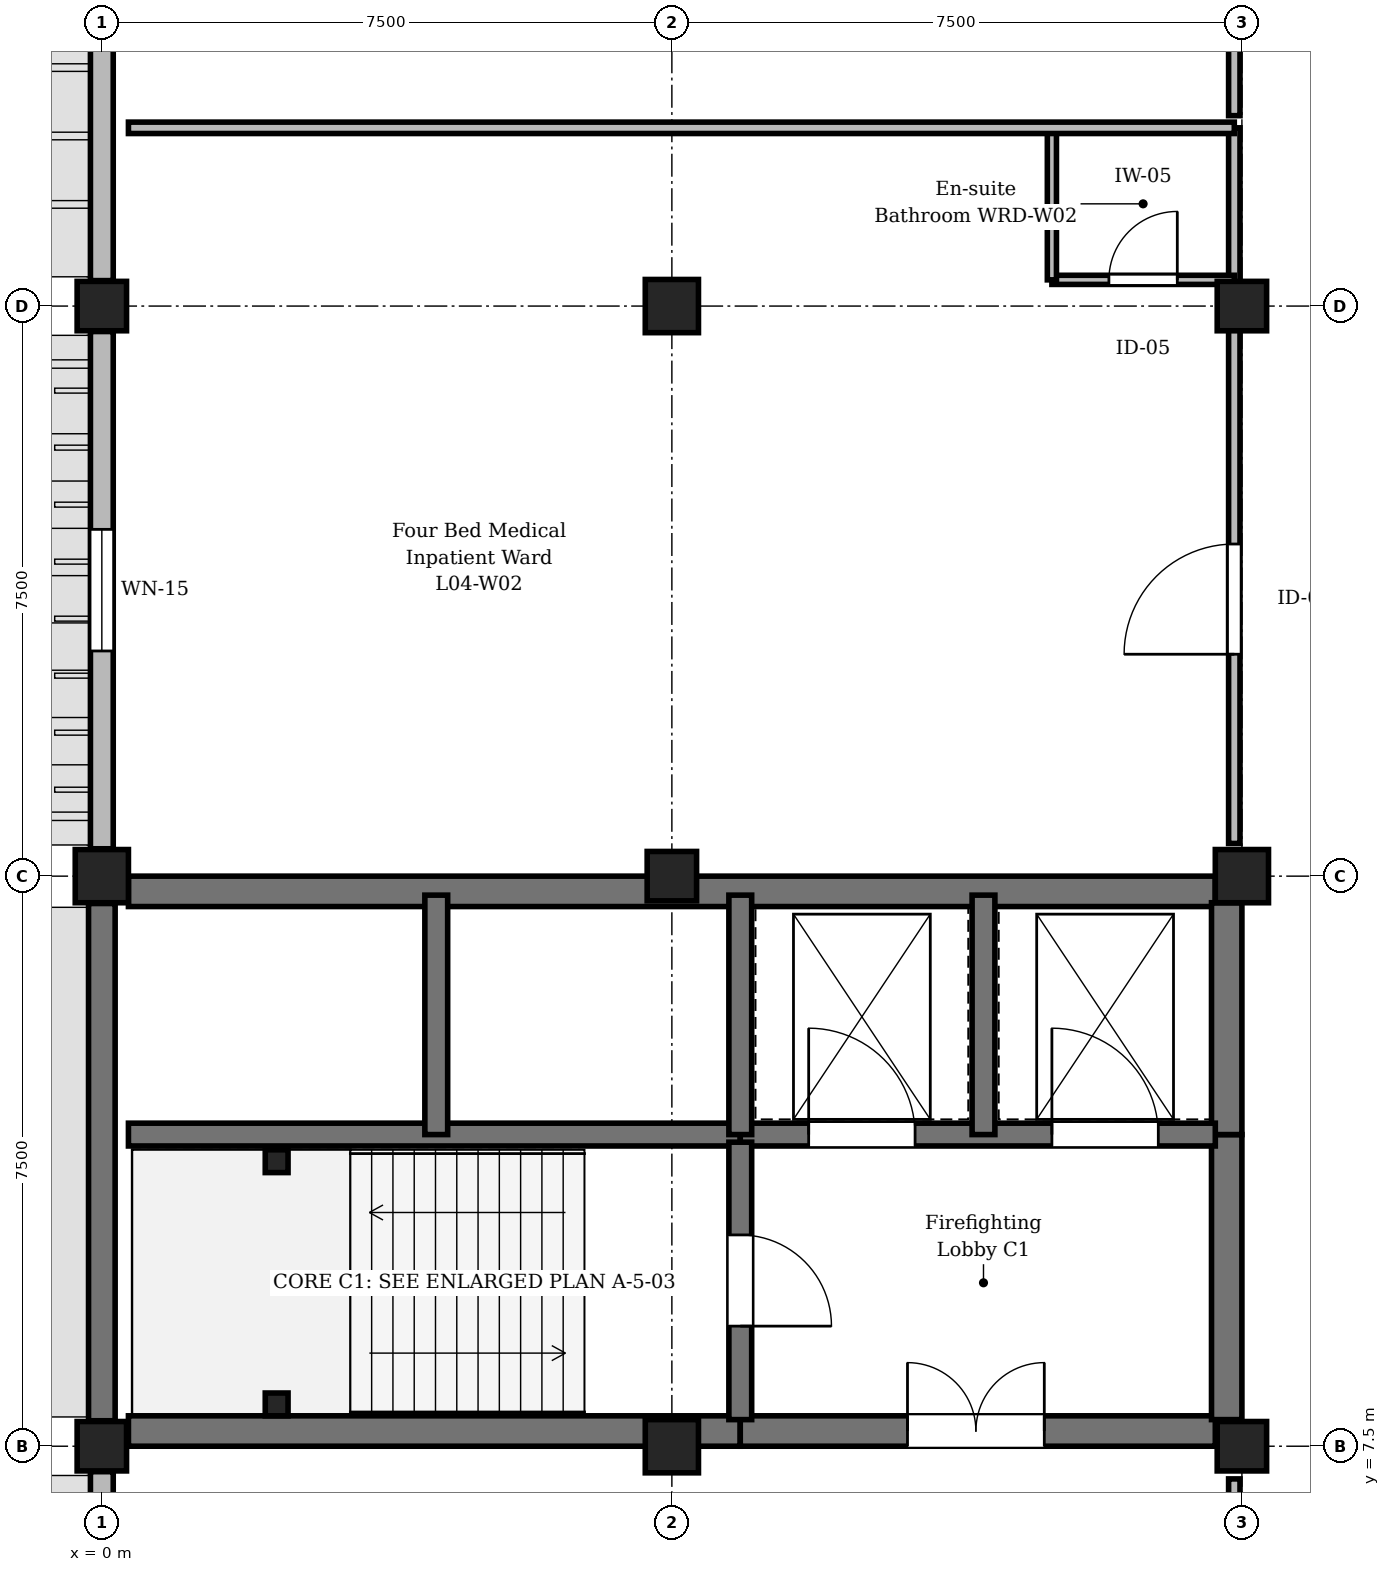
"""IFC4 building model, lengths in metres.
Left out: names, types, materials, properties, quantities, classifications, styles, units other than length and angle.
Written with IfcOpenShell. Run it as: python <this file> out.ifc"""

import sys

from ifc_helpers import new_model, si_unit, direction, frame, frame_2d, origin, origin_2d, place, context, subcontext, project, spatial, rectangle, i_section, extrude, element, fill, save


model = new_model("IFC4")
c1 = context("Model", 3, precision=1e-05, world=origin(), true_north=direction((0.0, 1.0)))
c2 = subcontext(c1, "Body", "Model", "MODEL_VIEW")
j1 = project(units=[si_unit("LENGTHUNIT", "METRE"), si_unit("PLANEANGLEUNIT", "RADIAN")], contexts=[c1])
p1 = place(None, origin())
s1 = spatial("IfcSite", under=j1, at=p1, CompositionType="ELEMENT")
p2 = place(p1, origin())
s2 = spatial("IfcBuilding", under=s1, at=p2, CompositionType="ELEMENT")
p3 = place(p2, frame((0.0, 0.0, 17.85)))
s3 = spatial("IfcBuildingStorey", under=s2, at=p3, CompositionType="ELEMENT", Elevation=17.85)
p4 = place(p3, frame((0.0, 7.5, 0.0), z_axis=(0.0, 0.0, 1.0), x_axis=(1.0, 0.0, 0.0)))
e1 = element("IfcColumn", 1, at=p4, inside=s3, PredefinedType="COLUMN", context=c2, shape_type="SweptSolid", body=[
    extrude(rectangle(XDim=0.65, YDim=0.65, at=origin_2d()), origin(), (0.0, 0.0, 1.0), 4.05),
])
p5 = place(p3, frame((0.0, 15.0, 0.0), z_axis=(0.0, 0.0, 1.0), x_axis=(1.0, 0.0, 0.0)))
e2 = element("IfcColumn", 2, at=p5, inside=s3, PredefinedType="COLUMN", context=c2, shape_type="SweptSolid", body=[
    extrude(rectangle(XDim=0.7, YDim=0.7, at=origin_2d()), origin(), (0.0, 0.0, 1.0), 4.05),
])
p6 = place(p3, frame((0.0, 22.5, 0.0), z_axis=(0.0, 0.0, 1.0), x_axis=(1.0, 0.0, 0.0)))
e3 = element("IfcColumn", 3, at=p6, inside=s3, PredefinedType="COLUMN", context=c2, shape_type="SweptSolid", body=[
    extrude(rectangle(XDim=0.65, YDim=0.65, at=origin_2d()), origin(), (0.0, 0.0, 1.0), 4.05),
])
p7 = place(p3, frame((7.5, 7.5, 0.0), z_axis=(0.0, 0.0, 1.0), x_axis=(1.0, 0.0, 0.0)))
e4 = element("IfcColumn", 4, at=p7, inside=s3, PredefinedType="COLUMN", context=c2, shape_type="SweptSolid", body=[
    extrude(rectangle(XDim=0.7, YDim=0.7, at=origin_2d()), origin(), (0.0, 0.0, 1.0), 4.05),
])
p8 = place(p3, frame((7.5, 15.0, 0.0), z_axis=(0.0, 0.0, 1.0), x_axis=(1.0, 0.0, 0.0)))
e5 = element("IfcColumn", 5, at=p8, inside=s3, PredefinedType="COLUMN", context=c2, shape_type="SweptSolid", body=[
    extrude(rectangle(XDim=0.65, YDim=0.65, at=origin_2d()), origin(), (0.0, 0.0, 1.0), 4.05),
])
p9 = place(p3, frame((7.5, 22.5, 0.0), z_axis=(0.0, 0.0, 1.0), x_axis=(1.0, 0.0, 0.0)))
e6 = element("IfcColumn", 6, at=p9, inside=s3, PredefinedType="COLUMN", context=c2, shape_type="SweptSolid", body=[
    extrude(rectangle(XDim=0.7, YDim=0.7, at=origin_2d()), origin(), (0.0, 0.0, 1.0), 4.05),
])
p10 = place(p3, frame((15.0, 7.5, 0.0), z_axis=(0.0, 0.0, 1.0), x_axis=(1.0, 0.0, 0.0)))
e7 = element("IfcColumn", 7, at=p10, inside=s3, PredefinedType="COLUMN", context=c2, shape_type="SweptSolid", body=[
    extrude(rectangle(XDim=0.65, YDim=0.65, at=origin_2d()), origin(), (0.0, 0.0, 1.0), 4.05),
])
p11 = place(p3, frame((15.0, 15.0, 0.0), z_axis=(0.0, 0.0, 1.0), x_axis=(1.0, 0.0, 0.0)))
e8 = element("IfcColumn", 8, at=p11, inside=s3, PredefinedType="COLUMN", context=c2, shape_type="SweptSolid", body=[
    extrude(rectangle(XDim=0.7, YDim=0.7, at=origin_2d()), origin(), (0.0, 0.0, 1.0), 4.05),
])
p12 = place(p3, frame((15.0, 22.5, 0.0), z_axis=(0.0, 0.0, 1.0), x_axis=(1.0, 0.0, 0.0)))
e9 = element("IfcColumn", 9, at=p12, inside=s3, PredefinedType="COLUMN", context=c2, shape_type="SweptSolid", body=[
    extrude(rectangle(XDim=0.65, YDim=0.65, at=origin_2d()), origin(), (0.0, 0.0, 1.0), 4.05),
])
for number, where, z_axis, x_axis in (
    (10, (2.3, 8.05, 0.0), (0.0, 0.0, 1.0), (1.0, 0.0, 0.0)),
    (11, (2.3, 11.25, 0.0), (0.0, 0.0, 1.0), (1.0, 0.0, 0.0)),
):
    element("IfcColumn", number, at=place(p3, frame(where, z_axis=z_axis, x_axis=x_axis)), inside=s3, PredefinedType="COLUMN", context=c2, shape_type="SweptSolid", body=[
        extrude(i_section(OverallWidth=0.3, OverallDepth=0.3, WebThickness=0.011, FlangeThickness=0.019, FilletRadius=0.027, at=origin_2d()), origin(), (0.0, 0.0, 1.0), 4.05),
    ])
p13 = place(p3, frame((0.0, 0.31, 0.0), z_axis=(0.0, 0.0, 1.0), x_axis=(0.0, 1.0, 0.0)))
e12 = element("IfcWall", 12, at=p13, inside=s3, PredefinedType="STANDARD", context=c2, shape_type="SweptSolid", body=[
    extrude(rectangle(XDim=6.855, YDim=0.3, at=frame_2d((3.427, 0.0))), origin(), (0.0, 0.0, 1.0), 3.17),
])
p14 = place(p13, frame((2.327, 0.0, 0.9)))
e13 = element("IfcOpeningElement", 13, at=p14, cuts=e12, PredefinedType="OPENING", context=c2, shape_type="SweptSolid", body=[
    extrude(rectangle(XDim=2.2, YDim=1.95, at=frame_2d((1.1, 0.975))), frame((0.0, 0.16, 0.0), z_axis=(0.0, -1.0, 0.0), x_axis=(1.0, 0.0, 0.0)), (0.0, 0.0, 1.0), 0.32),
])
p15 = place(p3, frame((0.0, 7.835, 0.0), z_axis=(0.0, 0.0, 1.0), x_axis=(0.0, 1.0, 0.0)))
e14 = element("IfcWall", 14, at=p15, inside=s3, PredefinedType="SHEAR", context=c2, shape_type="SweptSolid", body=[
    extrude(rectangle(XDim=6.805, YDim=0.35, at=frame_2d((3.402, 0.0))), origin(), (0.0, 0.0, 1.0), 3.77),
])
p16 = place(p3, frame((0.0, 15.36, 0.0), z_axis=(0.0, 0.0, 1.0), x_axis=(0.0, 1.0, 0.0)))
e15 = element("IfcWall", 15, at=p16, inside=s3, PredefinedType="STANDARD", context=c2, shape_type="SweptSolid", body=[
    extrude(rectangle(XDim=6.805, YDim=0.3, at=frame_2d((3.402, 0.0))), origin(), (0.0, 0.0, 1.0), 3.17),
])
p17 = place(p16, frame((2.603, 0.0, 0.9)))
e16 = element("IfcOpeningElement", 16, at=p17, cuts=e15, PredefinedType="OPENING", context=c2, shape_type="SweptSolid", body=[
    extrude(rectangle(XDim=1.6, YDim=1.8, at=frame_2d((0.8, 0.9))), frame((0.0, 0.16, 0.0), z_axis=(0.0, -1.0, 0.0), x_axis=(1.0, 0.0, 0.0)), (0.0, 0.0, 1.0), 0.32),
])
p18 = place(p3, frame((0.0, 22.835, 0.0), z_axis=(0.0, 0.0, 1.0), x_axis=(0.0, 1.0, 0.0)))
e17 = element("IfcWall", 17, at=p18, inside=s3, PredefinedType="STANDARD", context=c2, shape_type="SweptSolid", body=[
    extrude(rectangle(XDim=8.305, YDim=0.3, at=frame_2d((4.152, 0.0))), origin(), (0.0, 0.0, 1.0), 3.22),
])
p19 = place(p18, frame((3.252, 0.0, 0.9)))
e18 = element("IfcOpeningElement", 18, at=p19, cuts=e17, PredefinedType="OPENING", context=c2, shape_type="SweptSolid", body=[
    extrude(rectangle(XDim=1.8, YDim=1.8, at=frame_2d((0.9, 0.9))), frame((0.0, 0.16, 0.0), z_axis=(0.0, -1.0, 0.0), x_axis=(1.0, 0.0, 0.0)), (0.0, 0.0, 1.0), 0.32),
])
p20 = place(p3, frame((0.35, 7.7, 0.0), z_axis=(0.0, 0.0, 1.0), x_axis=(1.0, 0.0, 0.0)))
e19 = element("IfcWall", 19, at=p20, inside=s3, PredefinedType="SHEAR", context=c2, shape_type="SweptSolid", body=[
    extrude(rectangle(XDim=8.05, YDim=0.4, at=frame_2d((4.025, 0.0))), origin(), (0.0, 0.0, 1.0), 3.77),
])
p21 = place(p3, frame((8.4, 7.7, 0.0), z_axis=(0.0, 0.0, 1.0), x_axis=(1.0, 0.0, 0.0)))
e20 = element("IfcWall", 20, at=p21, inside=s3, PredefinedType="SHEAR", context=c2, shape_type="SweptSolid", body=[
    extrude(rectangle(XDim=6.25, YDim=0.4, at=frame_2d((3.125, 0.0))), origin(), (0.0, 0.0, 1.0), 3.77),
])
p22 = place(p21, frame((2.2, 0.0, 0.0)))
e21 = element("IfcOpeningElement", 21, at=p22, cuts=e20, PredefinedType="OPENING", context=c2, shape_type="SweptSolid", body=[
    extrude(rectangle(XDim=1.8, YDim=2.25, at=frame_2d((0.9, 1.125))), frame((0.0, 0.21, 0.0), z_axis=(0.0, -1.0, 0.0), x_axis=(1.0, 0.0, 0.0)), (0.0, 0.0, 1.0), 0.42),
])
p23 = place(p3, frame((0.35, 14.8, 0.0), z_axis=(0.0, 0.0, 1.0), x_axis=(1.0, 0.0, 0.0)))
e22 = element("IfcWall", 22, at=p23, inside=s3, PredefinedType="SHEAR", context=c2, shape_type="SweptSolid", body=[
    extrude(rectangle(XDim=14.3, YDim=0.4, at=frame_2d((7.15, 0.0))), origin(), (0.0, 0.0, 1.0), 3.77),
])
p24 = place(p3, frame((14.8, 7.85, 0.0), z_axis=(0.0, 0.0, 1.0), x_axis=(0.0, 1.0, 0.0)))
e23 = element("IfcWall", 23, at=p24, inside=s3, PredefinedType="SHEAR", context=c2, shape_type="SweptSolid", body=[
    extrude(rectangle(XDim=3.75, YDim=0.4, at=frame_2d((1.875, 0.0))), origin(), (0.0, 0.0, 1.0), 3.77),
])
p25 = place(p3, frame((14.8, 11.6, 0.0), z_axis=(0.0, 0.0, 1.0), x_axis=(0.0, 1.0, 0.0)))
e24 = element("IfcWall", 24, at=p25, inside=s3, PredefinedType="SHEAR", context=c2, shape_type="SweptSolid", body=[
    extrude(rectangle(XDim=3.05, YDim=0.4, at=frame_2d((1.525, 0.0))), origin(), (0.0, 0.0, 1.0), 3.77),
])
p26 = place(p3, frame((0.35, 11.6, 0.0), z_axis=(0.0, 0.0, 1.0), x_axis=(1.0, 0.0, 0.0)))
e25 = element("IfcWall", 25, at=p26, inside=s3, PredefinedType="SHEAR", context=c2, shape_type="SweptSolid", body=[
    extrude(rectangle(XDim=8.05, YDim=0.3, at=frame_2d((4.025, 0.0))), origin(), (0.0, 0.0, 1.0), 3.77),
])
p27 = place(p3, frame((8.4, 11.6, 0.0), z_axis=(0.0, 0.0, 1.0), x_axis=(1.0, 0.0, 0.0)))
e26 = element("IfcWall", 26, at=p27, inside=s3, PredefinedType="SHEAR", context=c2, shape_type="SweptSolid", body=[
    extrude(rectangle(XDim=6.25, YDim=0.3, at=frame_2d((3.125, 0.0))), origin(), (0.0, 0.0, 1.0), 3.77),
])
p28 = place(p27, frame((0.9, 0.0, 0.0)))
e27 = element("IfcOpeningElement", 27, at=p28, cuts=e26, PredefinedType="OPENING", context=c2, shape_type="SweptSolid", body=[
    extrude(rectangle(XDim=1.4, YDim=2.25, at=frame_2d((0.7, 1.125))), frame((0.0, 0.16, 0.0), z_axis=(0.0, -1.0, 0.0), x_axis=(1.0, 0.0, 0.0)), (0.0, 0.0, 1.0), 0.32),
])
p29 = place(p27, frame((4.1, 0.0, 0.0)))
e28 = element("IfcOpeningElement", 28, at=p29, cuts=e26, PredefinedType="OPENING", context=c2, shape_type="SweptSolid", body=[
    extrude(rectangle(XDim=1.4, YDim=2.25, at=frame_2d((0.7, 1.125))), frame((0.0, 0.16, 0.0), z_axis=(0.0, -1.0, 0.0), x_axis=(1.0, 0.0, 0.0)), (0.0, 0.0, 1.0), 0.32),
])
p30 = place(p3, frame((8.4, 11.5, 0.0), z_axis=(0.0, 0.0, 1.0), x_axis=(0.0, -1.0, 0.0)))
e29 = element("IfcWall", 29, at=p30, inside=s3, PredefinedType="SHEAR", context=c2, shape_type="SweptSolid", body=[
    extrude(rectangle(XDim=3.65, YDim=0.3, at=frame_2d((1.825, 0.0))), origin(), (0.0, 0.0, 1.0), 3.77),
])
p31 = place(p30, frame((1.22, 0.0, 0.0)))
e30 = element("IfcOpeningElement", 30, at=p31, cuts=e29, PredefinedType="OPENING", context=c2, shape_type="SweptSolid", body=[
    extrude(rectangle(XDim=1.2, YDim=2.25, at=frame_2d((0.6, 1.125))), frame((0.0, 0.16, 0.0), z_axis=(0.0, -1.0, 0.0), x_axis=(1.0, 0.0, 0.0)), (0.0, 0.0, 1.0), 0.32),
])
for number, where, z_axis, x_axis in (
    (31, (4.4, 11.6, 0.0), (0.0, 0.0, 1.0), (0.0, 1.0, 0.0)),
    (32, (8.4, 11.6, 0.0), (0.0, 0.0, 1.0), (0.0, 1.0, 0.0)),
    (33, (11.6, 11.6, 0.0), (0.0, 0.0, 1.0), (0.0, 1.0, 0.0)),
):
    element("IfcWall", number, at=place(p3, frame(where, z_axis=z_axis, x_axis=x_axis)), inside=s3, PredefinedType="SHEAR", context=c2, shape_type="SweptSolid", body=[
        extrude(rectangle(XDim=3.15, YDim=0.3, at=frame_2d((1.575, 0.0))), origin(), (0.0, 0.0, 1.0), 3.77),
    ])
p32 = place(p3, frame((14.9, 2.68, 0.0), z_axis=(0.0, 0.0, 1.0), x_axis=(0.0, 1.0, 0.0)))
e34 = element("IfcWall", 34, at=p32, inside=s3, PredefinedType="PARTITIONING", context=c2, shape_type="SweptSolid", body=[
    extrude(rectangle(XDim=4.39, YDim=0.15, at=frame_2d((2.195, 0.0))), origin(), (0.0, 0.0, 1.0), 3.205),
])
p33 = place(p32, frame((0.504, 0.0, 0.0)))
e35 = element("IfcOpeningElement", 35, at=p33, cuts=e34, PredefinedType="OPENING", context=c2, shape_type="SweptSolid", body=[
    extrude(rectangle(XDim=1.35, YDim=2.25, at=frame_2d((0.675, 1.125))), frame((0.0, 0.085, 0.0), z_axis=(0.0, -1.0, 0.0), x_axis=(1.0, 0.0, 0.0)), (0.0, 0.0, 1.0), 0.17),
])
p34 = place(p3, frame((14.9, 15.43, 0.0), z_axis=(0.0, 0.0, 1.0), x_axis=(0.0, 1.0, 0.0)))
e36 = element("IfcWall", 36, at=p34, inside=s3, PredefinedType="PARTITIONING", context=c2, shape_type="SweptSolid", body=[
    extrude(rectangle(XDim=9.415, YDim=0.15, at=frame_2d((4.708, 0.0))), origin(), (0.0, 0.0, 1.0), 3.055),
])
p35 = place(p34, frame((2.49, 0.0, 0.0)))
e37 = element("IfcOpeningElement", 37, at=p35, cuts=e36, PredefinedType="OPENING", context=c2, shape_type="SweptSolid", body=[
    extrude(rectangle(XDim=1.45, YDim=2.3, at=frame_2d((0.725, 1.15))), frame((0.0, 0.085, 0.0), z_axis=(0.0, -1.0, 0.0), x_axis=(1.0, 0.0, 0.0)), (0.0, 0.0, 1.0), 0.17),
])
p36 = place(p3, frame((12.5, 22.845, 0.0), z_axis=(0.0, 0.0, 1.0), x_axis=(1.0, 0.0, 0.0)))
e38 = element("IfcWall", 38, at=p36, inside=s3, PredefinedType="PARTITIONING", context=c2, shape_type="SweptSolid", body=[
    extrude(rectangle(XDim=2.4, YDim=0.12, at=frame_2d((1.2, 0.0))), origin(), (0.0, 0.0, 1.0), 3.155),
])
p37 = place(p36, frame((0.75, 0.0, 0.0)))
e39 = element("IfcOpeningElement", 39, at=p37, cuts=e38, PredefinedType="OPENING", context=c2, shape_type="SweptSolid", body=[
    extrude(rectangle(XDim=0.9, YDim=2.1, at=frame_2d((0.45, 1.05))), frame((0.0, 0.07, 0.0), z_axis=(0.0, -1.0, 0.0), x_axis=(1.0, 0.0, 0.0)), (0.0, 0.0, 1.0), 0.14),
])
p38 = place(p3, frame((12.5, 22.845, 0.0), z_axis=(0.0, 0.0, 1.0), x_axis=(0.0, 1.0, 0.0)))
e40 = element("IfcWall", 40, at=p38, inside=s3, PredefinedType="PARTITIONING", context=c2, shape_type="SweptSolid", body=[
    extrude(rectangle(XDim=2.0, YDim=0.12, at=frame_2d((1.0, 0.0))), origin(), (0.0, 0.0, 1.0), 3.755),
])
p39 = place(p3, frame((14.9, 25.005, 0.0), z_axis=(0.0, 0.0, 1.0), x_axis=(0.0, 1.0, 0.0)))
e41 = element("IfcWall", 41, at=p39, inside=s3, PredefinedType="PARTITIONING", context=c2, shape_type="SweptSolid", body=[
    extrude(rectangle(XDim=9.415, YDim=0.15, at=frame_2d((4.708, 0.0))), origin(), (0.0, 0.0, 1.0), 3.055),
])
p40 = place(p39, frame((1.007, 0.0, 0.0)))
e42 = element("IfcOpeningElement", 42, at=p40, cuts=e41, PredefinedType="OPENING", context=c2, shape_type="SweptSolid", body=[
    extrude(rectangle(XDim=1.35, YDim=2.25, at=frame_2d((0.675, 1.125))), frame((0.0, 0.085, 0.0), z_axis=(0.0, -1.0, 0.0), x_axis=(1.0, 0.0, 0.0)), (0.0, 0.0, 1.0), 0.17),
])
p41 = place(p3, frame((0.35, 24.845, 0.0), z_axis=(0.0, 0.0, 1.0), x_axis=(1.0, 0.0, 0.0)))
e43 = element("IfcWall", 43, at=p41, inside=s3, PredefinedType="PARTITIONING", context=c2, shape_type="SweptSolid", body=[
    extrude(rectangle(XDim=14.55, YDim=0.15, at=frame_2d((7.275, 0.0))), origin(), (0.0, 0.0, 1.0), 3.755),
])
p42 = place(p17, origin())
e44 = element("IfcWindow", 44, at=p42, inside=s3, PartitioningType="SINGLE_PANEL", PredefinedType="WINDOW", context=c2, shape_type="SweptSolid", body=[
    extrude(rectangle(XDim=1.6, YDim=1.8, at=frame_2d((0.8, 0.9))), frame((0.0, 0.03, 0.0), z_axis=(0.0, -1.0, 0.0), x_axis=(1.0, 0.0, 0.0)), (0.0, 0.0, 1.0), 0.06),
])
fill(e16, e44)
p43 = place(p22, origin())
e45 = element("IfcDoor", 45, at=p43, inside=s3, OperationType="DOUBLE_DOOR_SINGLE_SWING", PredefinedType="DOOR", context=c2, shape_type="SweptSolid", body=[
    extrude(rectangle(XDim=1.8, YDim=2.25, at=frame_2d((0.9, 1.125))), frame((0.0, 0.025, 0.0), z_axis=(0.0, -1.0, 0.0), x_axis=(1.0, 0.0, 0.0)), (0.0, 0.0, 1.0), 0.05),
])
fill(e21, e45)
p44 = place(p28, origin())
e46 = element("IfcDoor", 46, at=p44, inside=s3, OperationType="DOUBLE_DOOR_SLIDING", PredefinedType="DOOR", context=c2, shape_type="SweptSolid", body=[
    extrude(rectangle(XDim=1.4, YDim=2.25, at=frame_2d((0.7, 1.125))), frame((0.0, 0.025, 0.0), z_axis=(0.0, -1.0, 0.0), x_axis=(1.0, 0.0, 0.0)), (0.0, 0.0, 1.0), 0.05),
])
fill(e27, e46)
p45 = place(p29, origin())
e47 = element("IfcDoor", 47, at=p45, inside=s3, OperationType="DOUBLE_DOOR_SLIDING", PredefinedType="DOOR", context=c2, shape_type="SweptSolid", body=[
    extrude(rectangle(XDim=1.4, YDim=2.25, at=frame_2d((0.7, 1.125))), frame((0.0, 0.025, 0.0), z_axis=(0.0, -1.0, 0.0), x_axis=(1.0, 0.0, 0.0)), (0.0, 0.0, 1.0), 0.05),
])
fill(e28, e47)
p46 = place(p31, origin())
e48 = element("IfcDoor", 48, at=p46, inside=s3, OperationType="SINGLE_SWING_RIGHT", PredefinedType="DOOR", context=c2, shape_type="SweptSolid", body=[
    extrude(rectangle(XDim=1.2, YDim=2.25, at=frame_2d((0.6, 1.125))), frame((0.0, 0.025, 0.0), z_axis=(0.0, -1.0, 0.0), x_axis=(1.0, 0.0, 0.0)), (0.0, 0.0, 1.0), 0.05),
])
fill(e30, e48)
p47 = place(p35, origin())
e49 = element("IfcDoor", 49, at=p47, inside=s3, OperationType="SINGLE_SWING_LEFT", PredefinedType="DOOR", context=c2, shape_type="SweptSolid", body=[
    extrude(rectangle(XDim=1.45, YDim=2.3, at=frame_2d((0.725, 1.15))), frame((0.0, 0.025, 0.0), z_axis=(0.0, -1.0, 0.0), x_axis=(1.0, 0.0, 0.0)), (0.0, 0.0, 1.0), 0.05),
])
fill(e37, e49)
p48 = place(p37, origin())
e50 = element("IfcDoor", 50, at=p48, inside=s3, OperationType="SINGLE_SWING_RIGHT", PredefinedType="DOOR", context=c2, shape_type="SweptSolid", body=[
    extrude(rectangle(XDim=0.9, YDim=2.1, at=frame_2d((0.45, 1.05))), frame((0.0, 0.025, 0.0), z_axis=(0.0, -1.0, 0.0), x_axis=(1.0, 0.0, 0.0)), (0.0, 0.0, 1.0), 0.05),
])
fill(e39, e50)
save(model, sys.argv[1])
